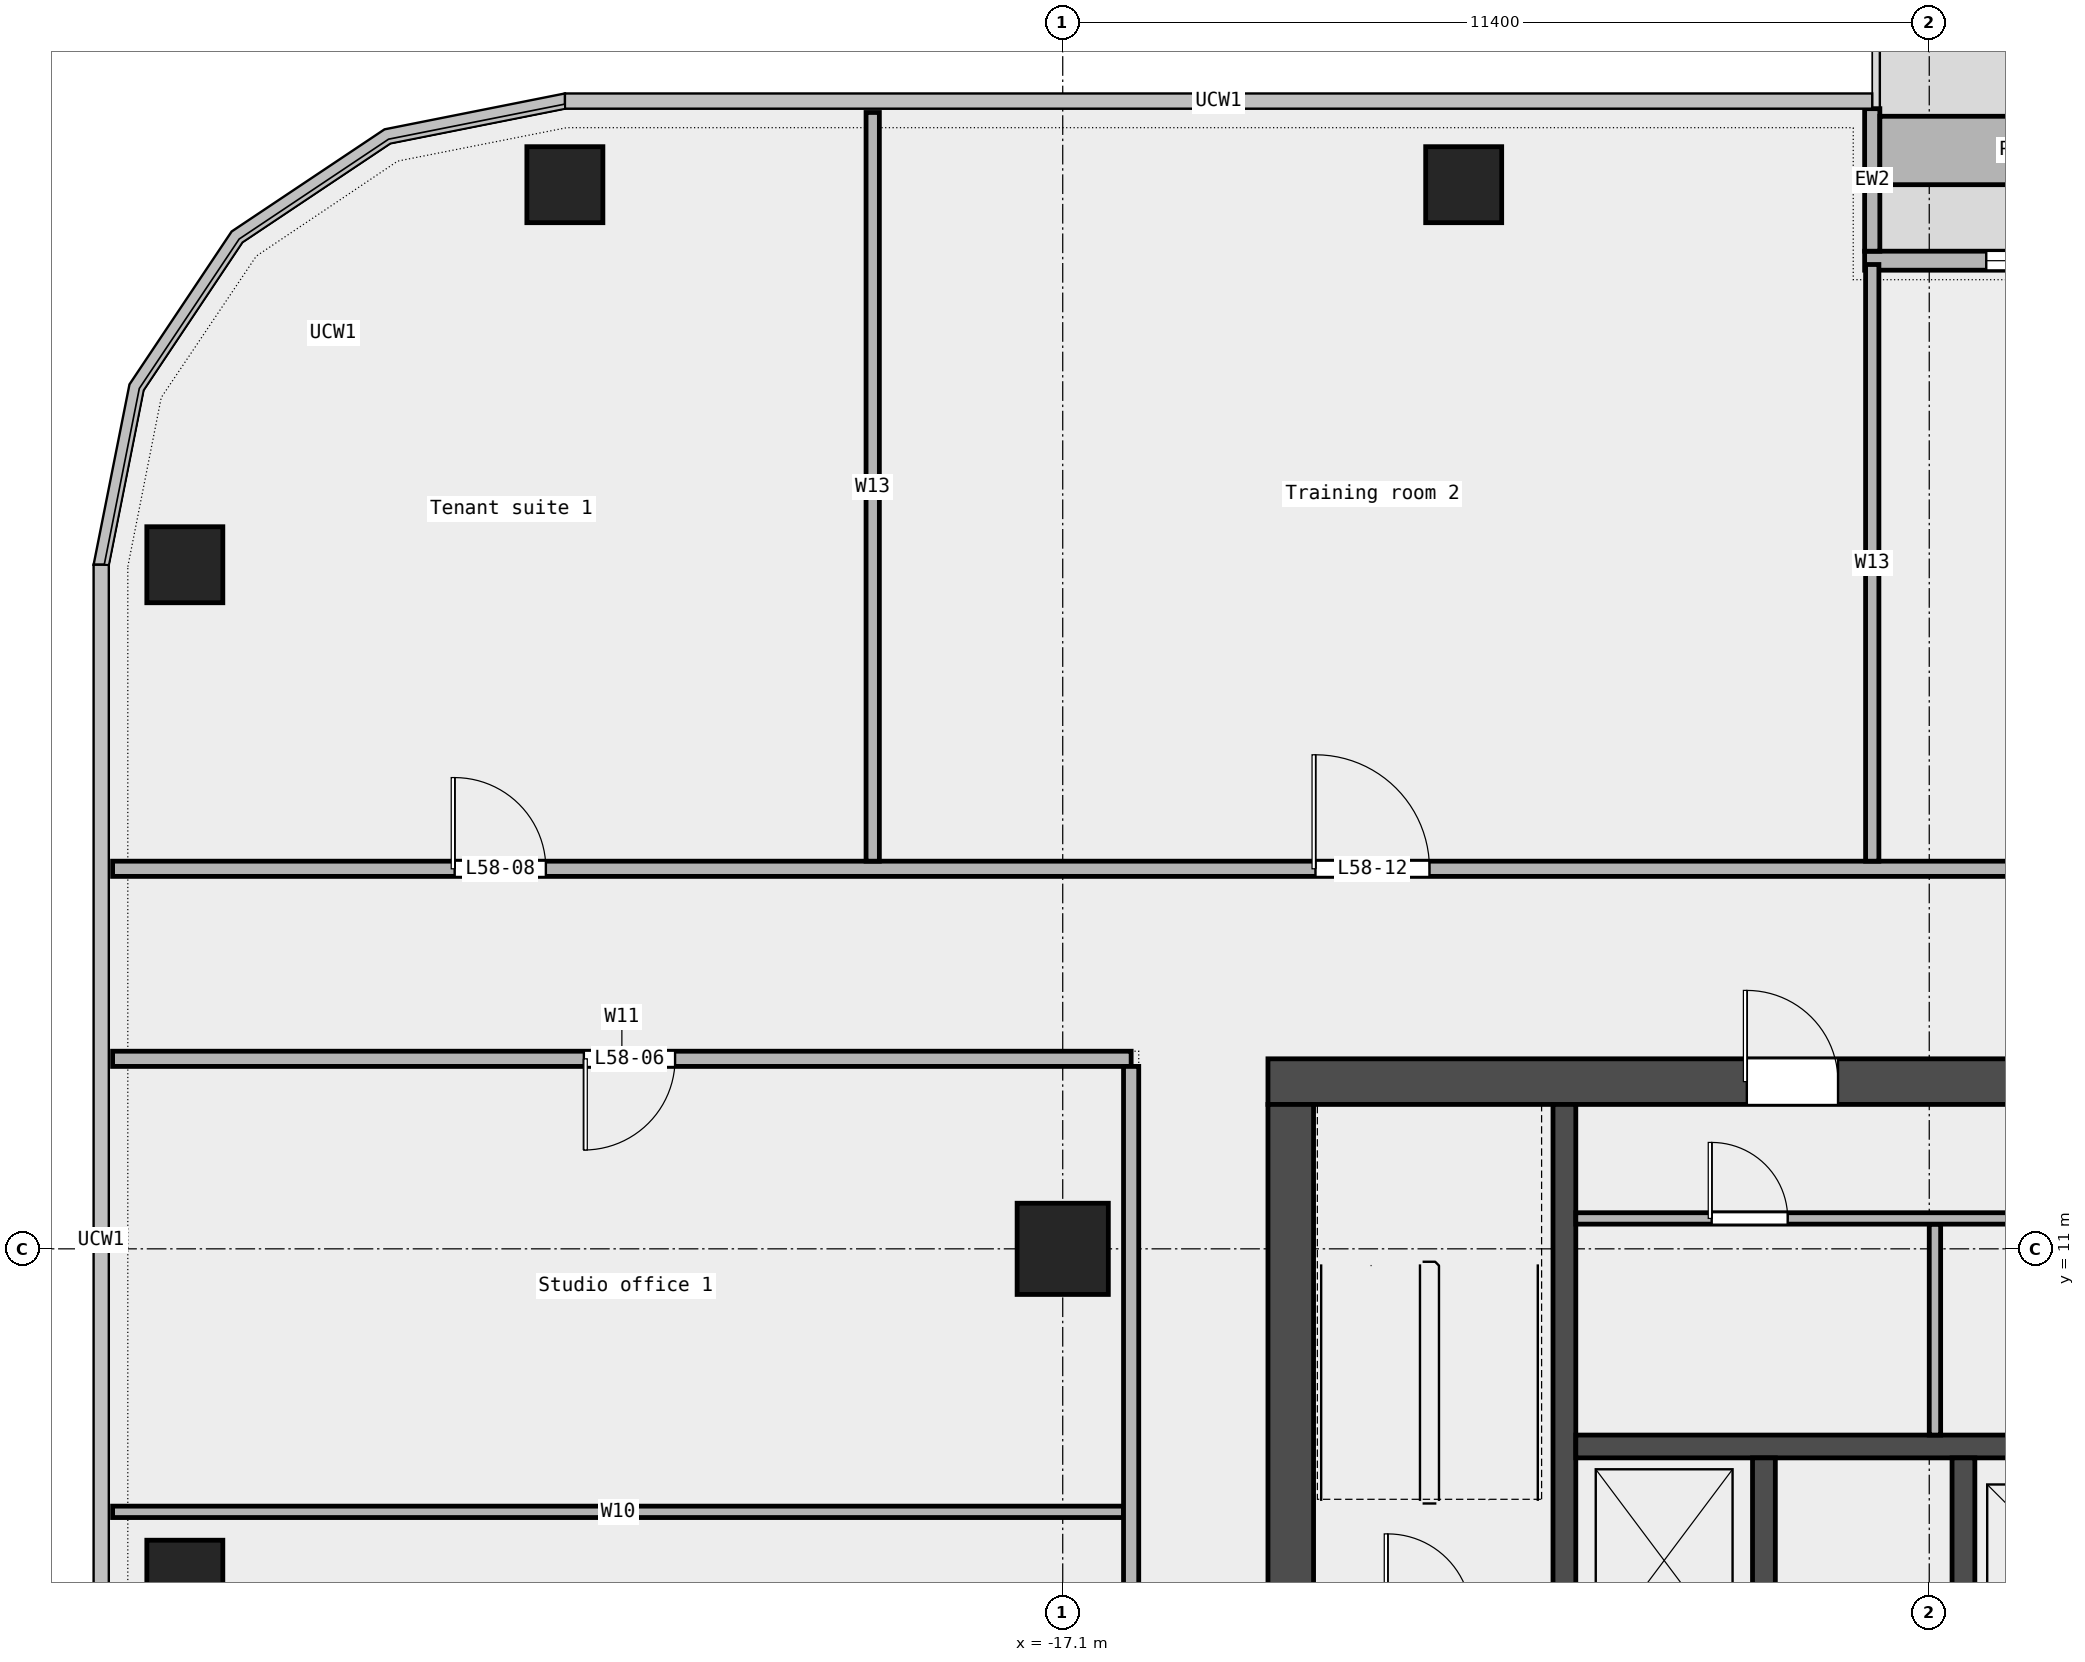
"""IFC4 building model, lengths in metres.
Left out: names, types, materials, properties, quantities, classifications, styles, units other than length and angle.
Written with IfcOpenShell. Run it as: python <this file> out.ifc"""

import sys

from ifc_helpers import new_model, si_unit, direction, frame, frame_2d, origin, origin_2d, place, context, subcontext, project, spatial, rectangle, extrude, element, fill, save


model = new_model("IFC4")
c1 = context("Model", 3, precision=1e-05, world=origin(), true_north=direction((0.0, 1.0)))
c2 = subcontext(c1, "Body", "Model", "MODEL_VIEW")
j1 = project(units=[si_unit("LENGTHUNIT", "METRE"), si_unit("PLANEANGLEUNIT", "RADIAN")], contexts=[c1])
p1 = place(None, origin())
s1 = spatial("IfcSite", under=j1, at=p1, CompositionType="ELEMENT")
p2 = place(p1, origin())
s2 = spatial("IfcBuilding", under=s1, at=p2, CompositionType="ELEMENT")
p3 = place(p2, frame((0.0, 0.0, 271.4)))
s3 = spatial("IfcBuildingStorey", under=s2, at=p3, CompositionType="ELEMENT", Elevation=271.4)
for number, where, z_axis, x_axis in (
    (1, (-11.825, 25.0, 0.0), (0.0, 0.0, 1.0), (1.0, 0.0, 0.0)),
    (2, (-23.65, 25.0, 0.0), (0.0, 0.0, 1.0), (1.0, 0.0, 0.0)),
    (3, (-28.65, 20.0, 0.0), (0.0, 0.0, 1.0), (1.0, 0.0, 0.0)),
    (4, (-28.65, 6.667, 0.0), (0.0, 0.0, 1.0), (1.0, 0.0, 0.0)),
):
    element("IfcColumn", number, at=place(p3, frame(where, z_axis=z_axis, x_axis=x_axis)), inside=s3, PredefinedType="COLUMN", context=c2, shape_type="SweptSolid", body=[
        extrude(rectangle(XDim=1.0, YDim=1.0, at=origin_2d()), origin(), (0.0, 0.0, 1.0), 3.6),
    ])
p4 = place(p3, frame((-17.1, 11.0, 0.0), z_axis=(0.0, 0.0, 1.0), x_axis=(1.0, 0.0, 0.0)))
e5 = element("IfcColumn", 5, at=p4, inside=s3, PredefinedType="COLUMN", context=c2, shape_type="SweptSolid", body=[
    extrude(rectangle(XDim=1.2, YDim=1.2, at=origin_2d()), origin(), (0.0, 0.0, 1.0), 3.6),
])
p5 = place(p3, frame((6.55, 24.0, 0.0), z_axis=(0.0, 0.0, 1.0), x_axis=(-1.0, 0.0, 0.0)))
e6 = element("IfcWall", 6, at=p5, inside=s3, PredefinedType="STANDARD", context=c2, shape_type="SweptSolid", body=[
    extrude(rectangle(XDim=13.1, YDim=0.25, at=frame_2d((6.55, 0.0))), origin(), (0.0, 0.0, 1.0), 3.6),
])
p6 = place(p5, frame((1.5, 0.0, 0.45)))
e7 = element("IfcOpeningElement", 7, at=p6, cuts=e6, PredefinedType="OPENING", context=c2, shape_type="SweptSolid", body=[
    extrude(rectangle(XDim=1.5, YDim=2.4, at=frame_2d((0.75, 1.2))), frame((0.0, 0.137, 0.0), z_axis=(0.0, -1.0, 0.0), x_axis=(1.0, 0.0, 0.0)), (0.0, 0.0, 1.0), 0.274),
])
p7 = place(p5, frame((7.5, 0.0, 0.0)))
e8 = element("IfcOpeningElement", 8, at=p7, cuts=e6, PredefinedType="OPENING", context=c2, shape_type="SweptSolid", body=[
    extrude(rectangle(XDim=1.8, YDim=2.4, at=frame_2d((0.9, 1.2))), frame((0.0, 0.137, 0.0), z_axis=(0.0, -1.0, 0.0), x_axis=(1.0, 0.0, 0.0)), (0.0, 0.0, 1.0), 0.274),
])
p8 = place(p5, frame((10.0, 0.0, 0.45)))
e9 = element("IfcOpeningElement", 9, at=p8, cuts=e6, PredefinedType="OPENING", context=c2, shape_type="SweptSolid", body=[
    extrude(rectangle(XDim=1.5, YDim=2.4, at=frame_2d((0.75, 1.2))), frame((0.0, 0.137, 0.0), z_axis=(0.0, -1.0, 0.0), x_axis=(1.0, 0.0, 0.0)), (0.0, 0.0, 1.0), 0.274),
])
p9 = place(p3, frame((-6.45, 26.0, 0.0), z_axis=(0.0, 0.0, 1.0), x_axis=(0.0, -1.0, 0.0)))
e10 = element("IfcWall", 10, at=p9, inside=s3, PredefinedType="STANDARD", context=c2, shape_type="SweptSolid", body=[
    extrude(rectangle(XDim=1.875, YDim=0.2, at=frame_2d((0.938, 0.0))), origin(), (0.0, 0.0, 1.0), 3.6),
])
p10 = place(p3, frame((-2.75, 25.45, 0.0), z_axis=(0.0, 0.0, 1.0), x_axis=(-1.0, 0.0, 0.0)))
e11 = element("IfcWall", 11, at=p10, inside=s3, PredefinedType="STANDARD", context=c2, shape_type="SweptSolid", body=[
    extrude(rectangle(XDim=3.6, YDim=0.9, at=frame_2d((1.8, 0.0))), origin(), (0.0, 0.0, 1.0), 0.7),
])
p11 = place(p3, frame((-29.6, 7.54, 0.0), z_axis=(0.0, 0.0, 1.0), x_axis=(1.0, 0.0, 0.0)))
e12 = element("IfcWall", 12, at=p11, inside=s3, PredefinedType="PARTITIONING", context=c2, shape_type="SweptSolid", body=[
    extrude(rectangle(XDim=13.3, YDim=0.15, at=frame_2d((6.65, 0.0))), origin(), (0.0, 0.0, 1.0), 3.6),
])
p12 = place(p3, frame((-29.6, 13.5, 0.0), z_axis=(0.0, 0.0, 1.0), x_axis=(1.0, 0.0, 0.0)))
e13 = element("IfcWall", 13, at=p12, inside=s3, PredefinedType="PARTITIONING", context=c2, shape_type="SweptSolid", body=[
    extrude(rectangle(XDim=13.4, YDim=0.2, at=frame_2d((6.7, 0.0))), origin(), (0.0, 0.0, 1.0), 3.6),
])
p13 = place(p12, frame((6.2, 0.0, 0.0)))
e14 = element("IfcOpeningElement", 14, at=p13, cuts=e13, PredefinedType="OPENING", context=c2, shape_type="SweptSolid", body=[
    extrude(rectangle(XDim=1.2, YDim=2.1, at=frame_2d((0.6, 1.05))), frame((0.0, 0.112, 0.0), z_axis=(0.0, -1.0, 0.0), x_axis=(1.0, 0.0, 0.0)), (0.0, 0.0, 1.0), 0.224),
])
p14 = place(p3, frame((-29.6, 16.0, 0.0), z_axis=(0.0, 0.0, 1.0), x_axis=(1.0, 0.0, 0.0)))
e15 = element("IfcWall", 15, at=p14, inside=s3, PredefinedType="PARTITIONING", context=c2, shape_type="SweptSolid", body=[
    extrude(rectangle(XDim=59.2, YDim=0.2, at=frame_2d((29.6, 0.0))), origin(), (0.0, 0.0, 1.0), 3.6),
])
p15 = place(p14, frame((46.625, 0.0, 0.0)))
e16 = element("IfcOpeningElement", 16, at=p15, cuts=e15, PredefinedType="OPENING", context=c2, shape_type="SweptSolid", body=[
    extrude(rectangle(XDim=1.8, YDim=2.1, at=frame_2d((0.9, 1.05))), frame((0.0, 0.112, 0.0), z_axis=(0.0, -1.0, 0.0), x_axis=(1.0, 0.0, 0.0)), (0.0, 0.0, 1.0), 0.224),
])
p16 = place(p14, frame((28.85, 0.0, 0.0)))
e17 = element("IfcOpeningElement", 17, at=p16, cuts=e15, PredefinedType="OPENING", context=c2, shape_type="SweptSolid", body=[
    extrude(rectangle(XDim=1.5, YDim=2.1, at=frame_2d((0.75, 1.05))), frame((0.0, 0.112, 0.0), z_axis=(0.0, -1.0, 0.0), x_axis=(1.0, 0.0, 0.0)), (0.0, 0.0, 1.0), 0.224),
])
p17 = place(p14, frame((4.5, 0.0, 0.0)))
e18 = element("IfcOpeningElement", 18, at=p17, cuts=e15, PredefinedType="OPENING", context=c2, shape_type="SweptSolid", body=[
    extrude(rectangle(XDim=1.2, YDim=2.1, at=frame_2d((0.6, 1.05))), frame((0.0, 0.112, 0.0), z_axis=(0.0, -1.0, 0.0), x_axis=(1.0, 0.0, 0.0)), (0.0, 0.0, 1.0), 0.224),
])
p18 = place(p14, frame((15.825, 0.0, 0.0)))
e19 = element("IfcOpeningElement", 19, at=p18, cuts=e15, PredefinedType="OPENING", context=c2, shape_type="SweptSolid", body=[
    extrude(rectangle(XDim=1.5, YDim=2.1, at=frame_2d((0.75, 1.05))), frame((0.0, 0.112, 0.0), z_axis=(0.0, -1.0, 0.0), x_axis=(1.0, 0.0, 0.0)), (0.0, 0.0, 1.0), 0.224),
])
p19 = place(p3, frame((-19.6, 16.1, 0.0), z_axis=(0.0, 0.0, 1.0), x_axis=(0.0, 1.0, 0.0)))
e20 = element("IfcWall", 20, at=p19, inside=s3, PredefinedType="PARTITIONING", context=c2, shape_type="SweptSolid", body=[
    extrude(rectangle(XDim=9.85, YDim=0.175, at=frame_2d((4.925, 0.0))), origin(), (0.0, 0.0, 1.0), 3.6),
])
p20 = place(p3, frame((-16.2, -7.1, 0.0), z_axis=(0.0, 0.0, 1.0), x_axis=(0.0, 1.0, 0.0)))
e21 = element("IfcWall", 21, at=p20, inside=s3, PredefinedType="PARTITIONING", context=c2, shape_type="SweptSolid", body=[
    extrude(rectangle(XDim=20.5, YDim=0.2, at=frame_2d((10.25, 0.0))), origin(), (0.0, 0.0, 1.0), 3.6),
])
p21 = place(p20, frame((11.845, 0.0, 0.0)))
e22 = element("IfcOpeningElement", 22, at=p21, cuts=e21, PredefinedType="OPENING", context=c2, shape_type="SweptSolid", body=[
    extrude(rectangle(XDim=1.2, YDim=2.1, at=frame_2d((0.6, 1.05))), frame((0.0, 0.112, 0.0), z_axis=(0.0, -1.0, 0.0), x_axis=(1.0, 0.0, 0.0)), (0.0, 0.0, 1.0), 0.224),
])
p22 = place(p3, frame((-6.45, 16.1, 0.0), z_axis=(0.0, 0.0, 1.0), x_axis=(0.0, 1.0, 0.0)))
e23 = element("IfcWall", 23, at=p22, inside=s3, PredefinedType="PARTITIONING", context=c2, shape_type="SweptSolid", body=[
    extrude(rectangle(XDim=7.85, YDim=0.175, at=frame_2d((3.925, 0.0))), origin(), (0.0, 0.0, 1.0), 3.6),
])
p23 = place(p3, frame((-14.4, 13.2, 0.0), z_axis=(0.0, 0.0, 1.0), x_axis=(1.0, 0.0, 0.0)))
e24 = element("IfcWall", 24, at=p23, inside=s3, PredefinedType="SHEAR", context=c2, shape_type="SweptSolid", body=[
    extrude(rectangle(XDim=28.8, YDim=0.6, at=frame_2d((14.4, 0.0))), origin(), (0.0, 0.0, 1.0), 3.7),
])
p24 = place(p23, frame((6.3, 0.0, 0.0)))
e25 = element("IfcOpeningElement", 25, at=p24, cuts=e24, PredefinedType="OPENING", context=c2, shape_type="SweptSolid", body=[
    extrude(rectangle(XDim=1.2, YDim=2.1, at=frame_2d((0.6, 1.05))), frame((0.0, 0.312, 0.0), z_axis=(0.0, -1.0, 0.0), x_axis=(1.0, 0.0, 0.0)), (0.0, 0.0, 1.0), 0.624),
])
p25 = place(p23, frame((21.3, 0.0, 0.0)))
e26 = element("IfcOpeningElement", 26, at=p25, cuts=e24, PredefinedType="OPENING", context=c2, shape_type="SweptSolid", body=[
    extrude(rectangle(XDim=1.2, YDim=2.1, at=frame_2d((0.6, 1.05))), frame((0.0, 0.312, 0.0), z_axis=(0.0, -1.0, 0.0), x_axis=(1.0, 0.0, 0.0)), (0.0, 0.0, 1.0), 0.624),
])
p26 = place(p3, frame((-14.1, -6.6, 0.0), z_axis=(0.0, 0.0, 1.0), x_axis=(0.0, 1.0, 0.0)))
e27 = element("IfcWall", 27, at=p26, inside=s3, PredefinedType="SHEAR", context=c2, shape_type="SweptSolid", body=[
    extrude(rectangle(XDim=19.5, YDim=0.6, at=frame_2d((9.75, 0.0))), origin(), (0.0, 0.0, 1.0), 3.7),
])
p27 = place(p26, frame((9.3, 0.0, 0.0)))
e28 = element("IfcOpeningElement", 28, at=p27, cuts=e27, PredefinedType="OPENING", context=c2, shape_type="SweptSolid", body=[
    extrude(rectangle(XDim=1.8, YDim=2.1, at=frame_2d((0.9, 1.05))), frame((0.0, 0.312, 0.0), z_axis=(0.0, -1.0, 0.0), x_axis=(1.0, 0.0, 0.0)), (0.0, 0.0, 1.0), 0.624),
])
p28 = place(p3, frame((-10.5, 5.25, 0.0), z_axis=(0.0, 0.0, 1.0), x_axis=(0.0, 1.0, 0.0)))
e29 = element("IfcWall", 29, at=p28, inside=s3, PredefinedType="SHEAR", context=c2, shape_type="SweptSolid", body=[
    extrude(rectangle(XDim=7.65, YDim=0.3, at=frame_2d((3.825, 0.0))), origin(), (0.0, 0.0, 1.0), 3.7),
])
p29 = place(p3, frame((-10.35, 8.4, 0.0), z_axis=(0.0, 0.0, 1.0), x_axis=(1.0, 0.0, 0.0)))
e30 = element("IfcWall", 30, at=p29, inside=s3, PredefinedType="SOLIDWALL", context=c2, shape_type="SweptSolid", body=[
    extrude(rectangle(XDim=20.7, YDim=0.3, at=frame_2d((10.35, 0.0))), origin(), (0.0, 0.0, 1.0), 3.7),
])
for number, where, z_axis, x_axis in (
    (31, (-7.875, 5.55, 0.0), (0.0, 0.0, 1.0), (0.0, 1.0, 0.0)),
    (32, (-5.25, 5.55, 0.0), (0.0, 0.0, 1.0), (0.0, 1.0, 0.0)),
):
    element("IfcWall", number, at=place(p3, frame(where, z_axis=z_axis, x_axis=x_axis)), inside=s3, PredefinedType="SOLIDWALL", context=c2, shape_type="SweptSolid", body=[
        extrude(rectangle(XDim=2.7, YDim=0.3, at=frame_2d((1.35, 0.0))), origin(), (0.0, 0.0, 1.0), 3.7),
    ])
p30 = place(p3, frame((-5.625, 8.55, 0.0), z_axis=(0.0, 0.0, 1.0), x_axis=(0.0, 1.0, 0.0)))
e33 = element("IfcWall", 33, at=p30, inside=s3, PredefinedType="PARTITIONING", context=c2, shape_type="SweptSolid", body=[
    extrude(rectangle(XDim=2.775, YDim=0.15, at=frame_2d((1.387, 0.0))), origin(), (0.0, 0.0, 1.0), 3.7),
])
p31 = place(p3, frame((-10.35, 11.4, 0.0), z_axis=(0.0, 0.0, 1.0), x_axis=(1.0, 0.0, 0.0)))
e34 = element("IfcWall", 34, at=p31, inside=s3, PredefinedType="PARTITIONING", context=c2, shape_type="SweptSolid", body=[
    extrude(rectangle(XDim=20.7, YDim=0.15, at=frame_2d((10.35, 0.0))), origin(), (0.0, 0.0, 1.0), 3.7),
])
p32 = place(p31, frame((1.788, 0.0, 0.0)))
e35 = element("IfcOpeningElement", 35, at=p32, cuts=e34, PredefinedType="OPENING", context=c2, shape_type="SweptSolid", body=[
    extrude(rectangle(XDim=1.0, YDim=2.1, at=frame_2d((0.5, 1.05))), frame((0.0, 0.087, 0.0), z_axis=(0.0, -1.0, 0.0), x_axis=(1.0, 0.0, 0.0)), (0.0, 0.0, 1.0), 0.174),
])
p33 = place(p31, frame((7.225, 0.0, 0.0)))
e36 = element("IfcOpeningElement", 36, at=p33, cuts=e34, PredefinedType="OPENING", context=c2, shape_type="SweptSolid", body=[
    extrude(rectangle(XDim=1.0, YDim=2.1, at=frame_2d((0.5, 1.05))), frame((0.0, 0.087, 0.0), z_axis=(0.0, -1.0, 0.0), x_axis=(1.0, 0.0, 0.0)), (0.0, 0.0, 1.0), 0.174),
])
p34 = place(p31, frame((12.1, 0.0, 0.0)))
e37 = element("IfcOpeningElement", 37, at=p34, cuts=e34, PredefinedType="OPENING", context=c2, shape_type="SweptSolid", body=[
    extrude(rectangle(XDim=1.0, YDim=2.1, at=frame_2d((0.5, 1.05))), frame((0.0, 0.087, 0.0), z_axis=(0.0, -1.0, 0.0), x_axis=(1.0, 0.0, 0.0)), (0.0, 0.0, 1.0), 0.174),
])
p35 = place(p31, frame((15.663, 0.0, 0.0)))
e38 = element("IfcOpeningElement", 38, at=p35, cuts=e34, PredefinedType="OPENING", context=c2, shape_type="SweptSolid", body=[
    extrude(rectangle(XDim=1.0, YDim=2.1, at=frame_2d((0.5, 1.05))), frame((0.0, 0.087, 0.0), z_axis=(0.0, -1.0, 0.0), x_axis=(1.0, 0.0, 0.0)), (0.0, 0.0, 1.0), 0.174),
])
p36 = place(p31, frame((18.85, 0.0, 0.0)))
e39 = element("IfcOpeningElement", 39, at=p36, cuts=e34, PredefinedType="OPENING", context=c2, shape_type="SweptSolid", body=[
    extrude(rectangle(XDim=1.0, YDim=2.1, at=frame_2d((0.5, 1.05))), frame((0.0, 0.087, 0.0), z_axis=(0.0, -1.0, 0.0), x_axis=(1.0, 0.0, 0.0)), (0.0, 0.0, 1.0), 0.174),
])
p37 = place(p8, origin())
e40 = element("IfcWindow", 40, at=p37, inside=s3, PartitioningType="SINGLE_PANEL", PredefinedType="WINDOW", context=c2, shape_type="SweptSolid", body=[
    extrude(rectangle(XDim=1.5, YDim=2.4, at=frame_2d((0.75, 1.2))), frame((0.0, 0.03, 0.0), z_axis=(0.0, -1.0, 0.0), x_axis=(1.0, 0.0, 0.0)), (0.0, 0.0, 1.0), 0.06),
])
fill(e9, e40)
p38 = place(p13, origin())
e41 = element("IfcDoor", 41, at=p38, inside=s3, OperationType="SINGLE_SWING_RIGHT", PredefinedType="DOOR", context=c2, shape_type="SweptSolid", body=[
    extrude(rectangle(XDim=1.2, YDim=2.1, at=frame_2d((0.6, 1.05))), frame((0.0, 0.025, 0.0), z_axis=(0.0, -1.0, 0.0), x_axis=(1.0, 0.0, 0.0)), (0.0, 0.0, 1.0), 0.05),
])
fill(e14, e41)
p39 = place(p17, origin())
e42 = element("IfcDoor", 42, at=p39, inside=s3, OperationType="SINGLE_SWING_LEFT", PredefinedType="DOOR", context=c2, shape_type="SweptSolid", body=[
    extrude(rectangle(XDim=1.2, YDim=2.1, at=frame_2d((0.6, 1.05))), frame((0.0, 0.025, 0.0), z_axis=(0.0, -1.0, 0.0), x_axis=(1.0, 0.0, 0.0)), (0.0, 0.0, 1.0), 0.05),
])
fill(e18, e42)
p40 = place(p18, origin())
e43 = element("IfcDoor", 43, at=p40, inside=s3, OperationType="DOUBLE_DOOR_SINGLE_SWING", PredefinedType="DOOR", context=c2, shape_type="SweptSolid", body=[
    extrude(rectangle(XDim=1.5, YDim=2.1, at=frame_2d((0.75, 1.05))), frame((0.0, 0.025, 0.0), z_axis=(0.0, -1.0, 0.0), x_axis=(1.0, 0.0, 0.0)), (0.0, 0.0, 1.0), 0.05),
])
fill(e19, e43)
p41 = place(p32, origin())
e44 = element("IfcDoor", 44, at=p41, inside=s3, OperationType="SINGLE_SWING_LEFT", PredefinedType="DOOR", context=c2, shape_type="SweptSolid", body=[
    extrude(rectangle(XDim=1.0, YDim=2.1, at=frame_2d((0.5, 1.05))), frame((0.0, 0.025, 0.0), z_axis=(0.0, -1.0, 0.0), x_axis=(1.0, 0.0, 0.0)), (0.0, 0.0, 1.0), 0.05),
])
fill(e35, e44)
p42 = place(p24, origin())
e45 = element("IfcDoor", 45, at=p42, inside=s3, OperationType="SINGLE_SWING_LEFT", PredefinedType="DOOR", context=c2, shape_type="SweptSolid", body=[
    extrude(rectangle(XDim=1.2, YDim=2.1, at=frame_2d((0.6, 1.05))), frame((0.0, 0.025, 0.0), z_axis=(0.0, -1.0, 0.0), x_axis=(1.0, 0.0, 0.0)), (0.0, 0.0, 1.0), 0.05),
])
fill(e25, e45)
save(model, sys.argv[1])
